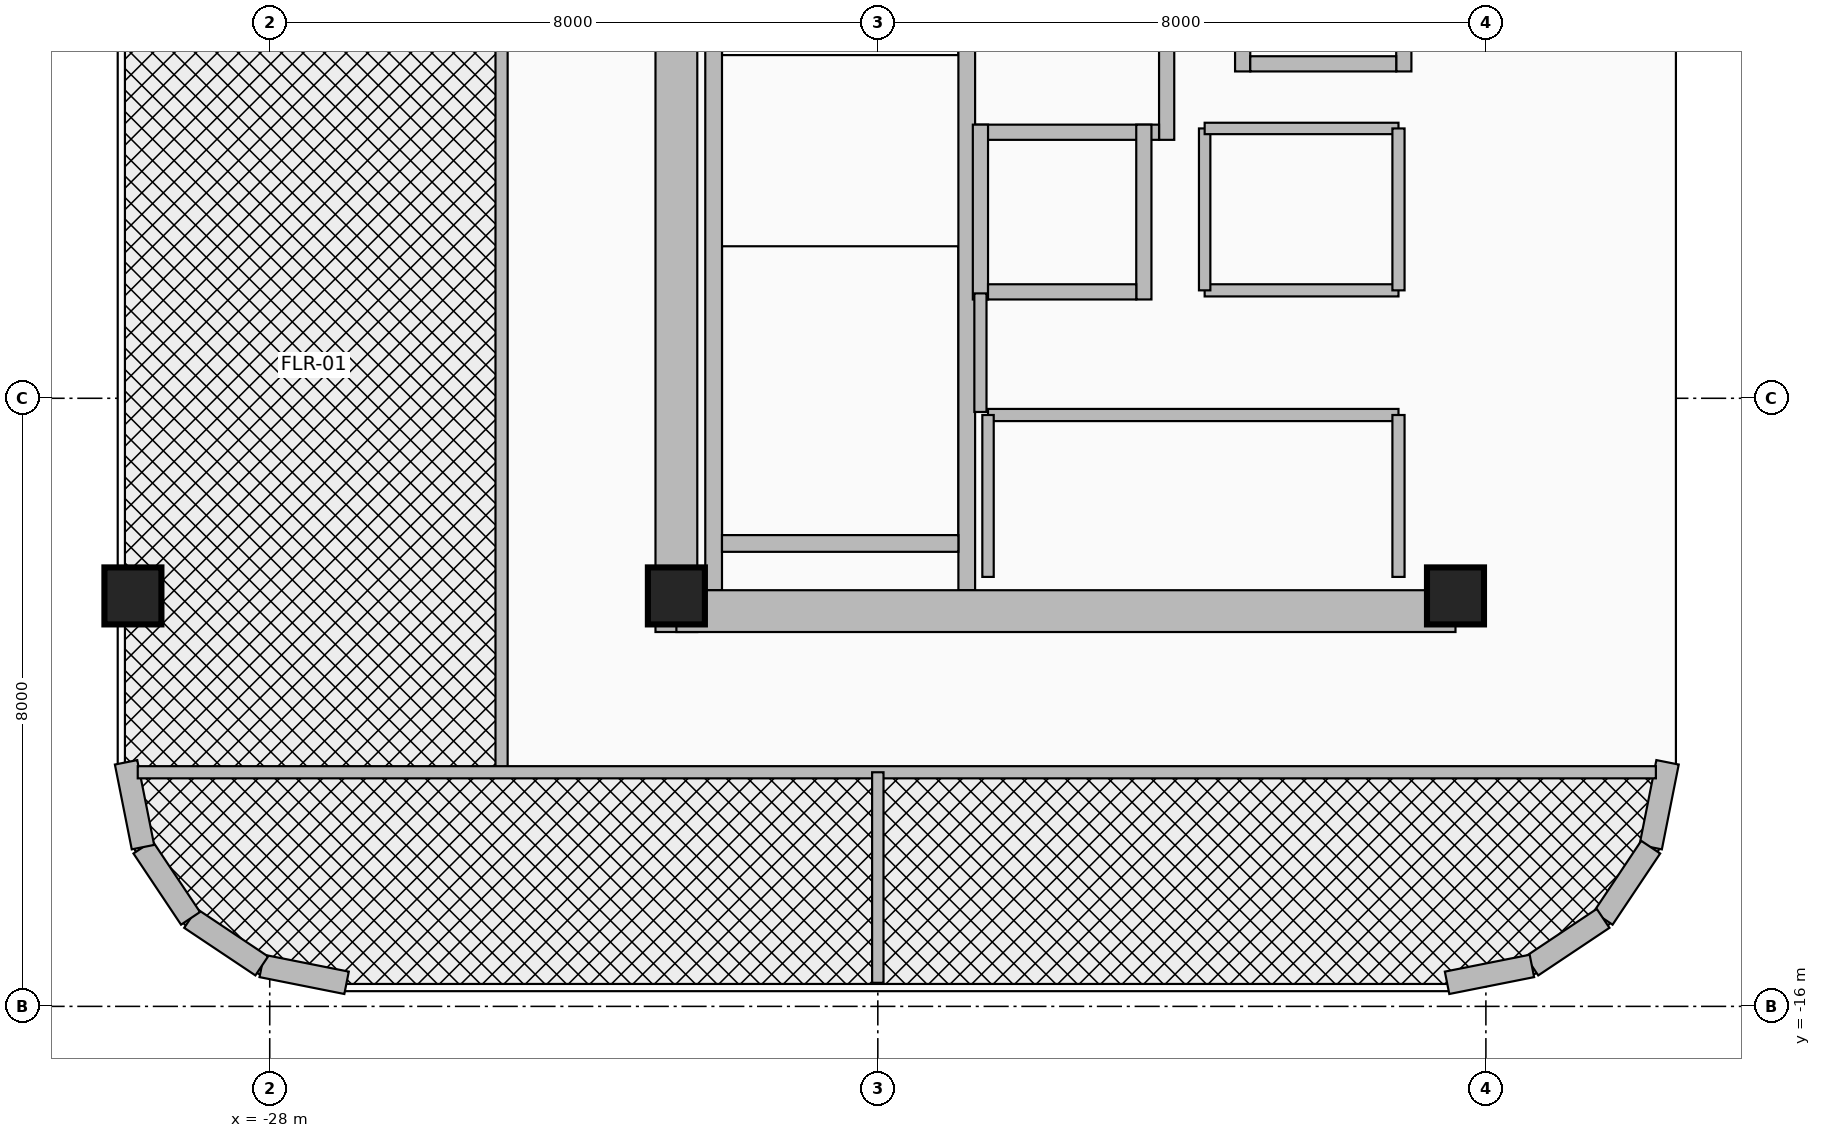
"""IFC4 building model, lengths in metres.
Left out: names, types, materials, properties, quantities, classifications, styles, units other than length and angle.
Written with IfcOpenShell. Run it as: python <this file> out.ifc"""

import sys

from ifc_helpers import new_model, si_unit, direction, frame, frame_2d, origin, origin_2d, place, context, subcontext, project, spatial, rectangle, extrude, source, transform, mapped, element, fill, save


model = new_model("IFC4")
c1 = context("Model", 3, precision=1e-05, world=origin(), true_north=direction((0.0, 1.0)))
c2 = subcontext(c1, "Body", "Model", "MODEL_VIEW")
j1 = project(units=[si_unit("LENGTHUNIT", "METRE"), si_unit("PLANEANGLEUNIT", "RADIAN")], contexts=[c1])
p1 = place(None, origin())
s1 = spatial("IfcSite", under=j1, at=p1, CompositionType="ELEMENT")
p2 = place(p1, origin())
s2 = spatial("IfcBuilding", under=s1, at=p2, CompositionType="ELEMENT")
p3 = place(p2, frame((0.0, 0.0, 290.6)))
s3 = spatial("IfcBuildingStorey", under=s2, at=p3, CompositionType="ELEMENT", Elevation=290.6)
for number, where, z_axis, x_axis in (
    (1, (-22.16, -10.525, 0.0), (0.0, 0.0, 1.0), (0.0, 1.0, 0.0)),
    (2, (-18.83, -10.525, 0.0), (0.0, 0.0, 1.0), (0.0, 1.0, 0.0)),
):
    element("IfcWall", number, at=place(p3, frame(where, z_axis=z_axis, x_axis=x_axis)), inside=s3, PredefinedType="SHEAR", context=c2, shape_type="SweptSolid", body=[
        extrude(rectangle(XDim=8.745, YDim=0.22, at=frame_2d((4.373, 0.0))), origin(), (0.0, 0.0, 1.0), 3.36),
    ])
p4 = place(p3, frame((-22.05, -9.91, 0.0), z_axis=(0.0, 0.0, 1.0), x_axis=(1.0, 0.0, 0.0)))
e3 = element("IfcWall", 3, at=p4, inside=s3, PredefinedType="SHEAR", context=c2, shape_type="SweptSolid", body=[
    extrude(rectangle(XDim=3.11, YDim=0.22, at=frame_2d((1.555, 0.0))), origin(), (0.0, 0.0, 1.0), 3.36),
])
p5 = place(p3, frame((-22.65, -11.075, 0.0), z_axis=(0.0, 0.0, 1.0), x_axis=(0.0, 1.0, 0.0)))
e4 = element("IfcWall", 4, at=p5, inside=s3, PredefinedType="SHEAR", context=c2, shape_type="SweptSolid", body=[
    extrude(rectangle(XDim=22.15, YDim=0.55, at=frame_2d((11.075, 0.0))), origin(), (0.0, 0.0, 1.0), 3.36),
])
p6 = place(p3, frame((-22.65, -10.8, 0.0), z_axis=(0.0, 0.0, 1.0), x_axis=(1.0, 0.0, 0.0)))
e5 = element("IfcWall", 5, at=p6, inside=s3, PredefinedType="SHEAR", context=c2, shape_type="SweptSolid", body=[
    extrude(rectangle(XDim=10.25, YDim=0.55, at=frame_2d((5.125, 0.0))), origin(), (0.0, 0.0, 1.0), 3.36),
])
m1 = source(origin(), c2, "Body", "SweptSolid", [
    extrude(rectangle(XDim=0.75, YDim=0.75, at=origin_2d()), origin(), (0.0, 0.0, 1.0), 3.6),
])
for number, where, z_axis, x_axis in (
    (6, (-29.8, -10.6, 0.0), (0.0, 0.0, 1.0), (1.0, 0.0, 0.0)),
    (7, (-22.65, -10.6, 0.0), (0.0, 0.0, 1.0), (1.0, 0.0, 0.0)),
    (8, (-12.4, -10.6, 0.0), (0.0, 0.0, 1.0), (1.0, 0.0, 0.0)),
):
    element("IfcColumn", number, at=place(p3, frame(where, z_axis=z_axis, x_axis=x_axis)), inside=s3, PredefinedType="COLUMN", context=c2, shape_type="MappedRepresentation", body=[
        mapped(m1, transform((0.0, 0.0, 0.0), x_axis=(1.0, 0.0, 0.0), y_axis=(0.0, 1.0, 0.0), z_axis=(0.0, 0.0, 1.0), scale=1.0)),
    ])
p7 = place(p3, frame((-9.61, -12.789, 0.0), z_axis=(0.0, 0.0, 1.0), x_axis=(-0.195043173023, -0.980794657743, 0.0)))
e9 = element("IfcWall", 9, at=p7, inside=s3, PredefinedType="SOLIDWALL", context=c2, shape_type="SweptSolid", body=[
    extrude(rectangle(XDim=1.138, YDim=0.3, at=frame_2d((0.569, 0.0))), origin(), (0.0, 0.0, 1.0), 3.36),
])
for number, where, z_axis, x_axis in (
    (10, (-9.832, -13.905, 0.0), (0.0, 0.0, 1.0), (-0.556, -0.831, 0.0)),
    (11, (-10.458, -14.842, 0.0), (0.0, 0.0, 1.0), (-0.831, -0.556, 0.0)),
):
    element("IfcWall", number, at=place(p3, frame(where, z_axis=z_axis, x_axis=x_axis)), inside=s3, PredefinedType="SOLIDWALL", context=c2, shape_type="SweptSolid", body=[
        extrude(rectangle(XDim=1.127, YDim=0.3, at=frame_2d((0.563, 0.0))), origin(), (0.0, 0.0, 1.0), 3.36),
    ])
for number, where, z_axis, x_axis in (
    (12, (-11.395, -15.468, 0.0), (0.0, 0.0, 1.0), (-0.981, -0.195, 0.0)),
    (13, (-26.989, -15.69, 0.0), (0.0, 0.0, 1.0), (-0.981, 0.195, 0.0)),
):
    element("IfcWall", number, at=place(p3, frame(where, z_axis=z_axis, x_axis=x_axis)), inside=s3, PredefinedType="SOLIDWALL", context=c2, shape_type="SweptSolid", body=[
        extrude(rectangle(XDim=1.138, YDim=0.3, at=frame_2d((0.569, 0.0))), origin(), (0.0, 0.0, 1.0), 3.36),
    ])
for number, where, z_axis, x_axis in (
    (14, (-28.105, -15.468, 0.0), (0.0, 0.0, 1.0), (-0.831, 0.556, 0.0)),
    (15, (-29.042, -14.842, 0.0), (0.0, 0.0, 1.0), (-0.556, 0.831, 0.0)),
):
    element("IfcWall", number, at=place(p3, frame(where, z_axis=z_axis, x_axis=x_axis)), inside=s3, PredefinedType="SOLIDWALL", context=c2, shape_type="SweptSolid", body=[
        extrude(rectangle(XDim=1.127, YDim=0.3, at=frame_2d((0.563, 0.0))), origin(), (0.0, 0.0, 1.0), 3.36),
    ])
p8 = place(p3, frame((-29.668, -13.905, 0.0), z_axis=(0.0, 0.0, 1.0), x_axis=(-0.195043173023, 0.980794657743, 0.0)))
e16 = element("IfcWall", 16, at=p8, inside=s3, PredefinedType="SOLIDWALL", context=c2, shape_type="SweptSolid", body=[
    extrude(rectangle(XDim=1.138, YDim=0.3, at=frame_2d((0.569, 0.0))), origin(), (0.0, 0.0, 1.0), 3.36),
])
p9 = place(p3, frame((-16.2, -4.6, 0.0), z_axis=(0.0, 0.0, 1.0), x_axis=(0.0, 1.0, 0.0)))
e17 = element("IfcWall", 17, at=p9, inside=s3, PredefinedType="MOVABLE", context=c2, shape_type="SweptSolid", body=[
    extrude(rectangle(XDim=3.2, YDim=0.2, at=frame_2d((1.6, 0.0))), origin(), (0.0, 0.0, 1.0), 3.36),
])
p10 = place(p3, frame((-18.72, -4.5, 0.0), z_axis=(0.0, 0.0, 1.0), x_axis=(1.0, 0.0, 0.0)))
e18 = element("IfcWall", 18, at=p10, inside=s3, PredefinedType="MOVABLE", context=c2, shape_type="SweptSolid", body=[
    extrude(rectangle(XDim=2.42, YDim=0.2, at=frame_2d((1.21, 0.0))), origin(), (0.0, 0.0, 1.0), 3.36),
])
for number, where, z_axis, x_axis in (
    (19, (-18.65, -6.7, 0.0), (0.0, 0.0, 1.0), (0.0, 1.0, 0.0)),
    (20, (-16.5, -6.7, 0.0), (0.0, 0.0, 1.0), (0.0, 1.0, 0.0)),
):
    element("IfcWall", number, at=place(p3, frame(where, z_axis=z_axis, x_axis=x_axis)), inside=s3, PredefinedType="MOVABLE", context=c2, shape_type="SweptSolid", body=[
        extrude(rectangle(XDim=2.3, YDim=0.2, at=frame_2d((1.15, 0.0))), origin(), (0.0, 0.0, 1.0), 3.36),
    ])
p11 = place(p3, frame((-18.55, -6.6, 0.0), z_axis=(0.0, 0.0, 1.0), x_axis=(1.0, 0.0, 0.0)))
e21 = element("IfcWall", 21, at=p11, inside=s3, PredefinedType="MOVABLE", context=c2, shape_type="SweptSolid", body=[
    extrude(rectangle(XDim=1.95, YDim=0.2, at=frame_2d((0.975, 0.0))), origin(), (0.0, 0.0, 1.0), 3.36),
])
p12 = place(p11, frame((0.425, 0.0, 0.0)))
e22 = element("IfcOpeningElement", 22, at=p12, cuts=e21, PredefinedType="OPENING", context=c2, shape_type="SweptSolid", body=[
    extrude(rectangle(XDim=1.1, YDim=2.1, at=frame_2d((0.55, 1.05))), frame((0.0, 0.115, 0.0), z_axis=(0.0, -1.0, 0.0), x_axis=(1.0, 0.0, 0.0)), (0.0, 0.0, 1.0), 0.23),
])
for number, where, z_axis, x_axis in (
    (23, (-15.2, -3.7, 0.0), (0.0, 0.0, 1.0), (0.0, 1.0, 0.0)),
    (24, (-13.08, -3.7, 0.0), (0.0, 0.0, 1.0), (0.0, 1.0, 0.0)),
):
    element("IfcWall", number, at=place(p3, frame(where, z_axis=z_axis, x_axis=x_axis)), inside=s3, PredefinedType="MOVABLE", context=c2, shape_type="SweptSolid", body=[
        extrude(rectangle(XDim=2.35, YDim=0.2, at=frame_2d((1.175, 0.0))), origin(), (0.0, 0.0, 1.0), 3.36),
    ])
p13 = place(p3, frame((-15.1, -3.6, 0.0), z_axis=(0.0, 0.0, 1.0), x_axis=(1.0, 0.0, 0.0)))
e25 = element("IfcWall", 25, at=p13, inside=s3, PredefinedType="MOVABLE", context=c2, shape_type="SweptSolid", body=[
    extrude(rectangle(XDim=1.92, YDim=0.2, at=frame_2d((0.96, 0.0))), origin(), (0.0, 0.0, 1.0), 3.36),
])
p14 = place(p3, frame((-18.65, -8.18, 0.0), z_axis=(0.0, 0.0, 1.0), x_axis=(0.0, 1.0, 0.0)))
e26 = element("IfcWall", 26, at=p14, inside=s3, PredefinedType="PARTITIONING", context=c2, shape_type="SweptSolid", body=[
    extrude(rectangle(XDim=1.56, YDim=0.16, at=frame_2d((0.78, 0.0))), origin(), (0.0, 0.0, 1.0), 3.36),
])
p15 = place(p3, frame((-18.55, -8.22, 0.0), z_axis=(0.0, 0.0, 1.0), x_axis=(1.0, 0.0, 0.0)))
e27 = element("IfcWall", 27, at=p15, inside=s3, PredefinedType="PARTITIONING", context=c2, shape_type="SweptSolid", body=[
    extrude(rectangle(XDim=5.4, YDim=0.16, at=frame_2d((2.7, 0.0))), origin(), (0.0, 0.0, 1.0), 3.36),
])
p16 = place(p15, frame((1.15, 0.0, 0.0)))
e28 = element("IfcOpeningElement", 28, at=p16, cuts=e27, PredefinedType="OPENING", context=c2, shape_type="SweptSolid", body=[
    extrude(rectangle(XDim=0.95, YDim=2.15, at=frame_2d((0.475, 1.075))), frame((0.0, 0.095, 0.0), z_axis=(0.0, -1.0, 0.0), x_axis=(1.0, 0.0, 0.0)), (0.0, 0.0, 1.0), 0.19),
])
p17 = place(p3, frame((-18.55, -10.35, 0.0), z_axis=(0.0, 0.0, 1.0), x_axis=(0.0, 1.0, 0.0)))
e29 = element("IfcWall", 29, at=p17, inside=s3, PredefinedType="PARTITIONING", context=c2, shape_type="SweptSolid", body=[
    extrude(rectangle(XDim=2.13, YDim=0.15, at=frame_2d((1.065, 0.0))), origin(), (0.0, 0.0, 1.0), 3.36),
])
p18 = place(p3, frame((-13.15, -10.35, 0.0), z_axis=(0.0, 0.0, 1.0), x_axis=(0.0, 1.0, 0.0)))
e30 = element("IfcWall", 30, at=p18, inside=s3, PredefinedType="PARTITIONING", context=c2, shape_type="SweptSolid", body=[
    extrude(rectangle(XDim=2.13, YDim=0.16, at=frame_2d((1.065, 0.0))), origin(), (0.0, 0.0, 1.0), 3.36),
])
p19 = place(p3, frame((-15.7, -6.58, 0.0), z_axis=(0.0, 0.0, 1.0), x_axis=(1.0, 0.0, 0.0)))
e31 = element("IfcWall", 31, at=p19, inside=s3, PredefinedType="PARTITIONING", context=c2, shape_type="SweptSolid", body=[
    extrude(rectangle(XDim=2.55, YDim=0.16, at=frame_2d((1.275, 0.0))), origin(), (0.0, 0.0, 1.0), 3.36),
])
p20 = place(p19, frame((0.5, 0.0, 0.0)))
e32 = element("IfcOpeningElement", 32, at=p20, cuts=e31, PredefinedType="OPENING", context=c2, shape_type="SweptSolid", body=[
    extrude(rectangle(XDim=0.85, YDim=2.05, at=frame_2d((0.425, 1.025))), frame((0.0, 0.095, 0.0), z_axis=(0.0, -1.0, 0.0), x_axis=(1.0, 0.0, 0.0)), (0.0, 0.0, 1.0), 0.19),
])
p21 = place(p3, frame((-15.7, -6.58, 0.0), z_axis=(0.0, 0.0, 1.0), x_axis=(0.0, 1.0, 0.0)))
e33 = element("IfcWall", 33, at=p21, inside=s3, PredefinedType="PARTITIONING", context=c2, shape_type="SweptSolid", body=[
    extrude(rectangle(XDim=2.13, YDim=0.15, at=frame_2d((1.065, 0.0))), origin(), (0.0, 0.0, 1.0), 3.36),
])
p22 = place(p3, frame((-15.7, -4.45, 0.0), z_axis=(0.0, 0.0, 1.0), x_axis=(1.0, 0.0, 0.0)))
e34 = element("IfcWall", 34, at=p22, inside=s3, PredefinedType="PARTITIONING", context=c2, shape_type="SweptSolid", body=[
    extrude(rectangle(XDim=2.55, YDim=0.15, at=frame_2d((1.275, 0.0))), origin(), (0.0, 0.0, 1.0), 3.36),
])
p23 = place(p3, frame((-13.15, -6.58, 0.0), z_axis=(0.0, 0.0, 1.0), x_axis=(0.0, 1.0, 0.0)))
e35 = element("IfcWall", 35, at=p23, inside=s3, PredefinedType="PARTITIONING", context=c2, shape_type="SweptSolid", body=[
    extrude(rectangle(XDim=2.13, YDim=0.16, at=frame_2d((1.065, 0.0))), origin(), (0.0, 0.0, 1.0), 3.36),
])
p24 = place(p3, frame((-24.95, -12.92, 0.0), z_axis=(0.0, 0.0, 1.0), x_axis=(0.0, 1.0, 0.0)))
e36 = element("IfcWall", 36, at=p24, inside=s3, PredefinedType="PARTITIONING", context=c2, shape_type="SweptSolid", body=[
    extrude(rectangle(XDim=21.72, YDim=0.16, at=frame_2d((10.86, 0.0))), origin(), (0.0, 0.0, 1.0), 2.723),
])
p25 = place(p24, frame((2.5, 0.0, 0.0)))
e37 = element("IfcOpeningElement", 37, at=p25, cuts=e36, PredefinedType="OPENING", context=c2, shape_type="SweptSolid", body=[
    extrude(rectangle(XDim=1.8, YDim=2.15, at=frame_2d((0.9, 1.075))), frame((0.0, 0.095, 0.0), z_axis=(0.0, -1.0, 0.0), x_axis=(1.0, 0.0, 0.0)), (0.0, 0.0, 1.0), 0.19),
])
p26 = place(p24, frame((12.72, 0.0, 0.0)))
e38 = element("IfcOpeningElement", 38, at=p26, cuts=e36, PredefinedType="OPENING", context=c2, shape_type="SweptSolid", body=[
    extrude(rectangle(XDim=1.8, YDim=2.15, at=frame_2d((0.9, 1.075))), frame((0.0, 0.095, 0.0), z_axis=(0.0, -1.0, 0.0), x_axis=(1.0, 0.0, 0.0)), (0.0, 0.0, 1.0), 0.19),
])
p27 = place(p24, frame((17.92, 0.0, 0.0)))
e39 = element("IfcOpeningElement", 39, at=p27, cuts=e36, PredefinedType="OPENING", context=c2, shape_type="SweptSolid", body=[
    extrude(rectangle(XDim=0.9, YDim=2.1, at=frame_2d((0.45, 1.05))), frame((0.0, 0.095, 0.0), z_axis=(0.0, -1.0, 0.0), x_axis=(1.0, 0.0, 0.0)), (0.0, 0.0, 1.0), 0.19),
])
p28 = place(p3, frame((-29.737, -12.92, 0.0), z_axis=(0.0, 0.0, 1.0), x_axis=(1.0, 0.0, 0.0)))
e40 = element("IfcWall", 40, at=p28, inside=s3, PredefinedType="PARTITIONING", context=c2, shape_type="SweptSolid", body=[
    extrude(rectangle(XDim=19.973, YDim=0.16, at=frame_2d((9.987, 0.0))), origin(), (0.0, 0.0, 1.0), 3.36),
])
p29 = place(p28, frame((5.0, 0.0, 0.0)))
e41 = element("IfcOpeningElement", 41, at=p29, cuts=e40, PredefinedType="OPENING", context=c2, shape_type="SweptSolid", body=[
    extrude(rectangle(XDim=0.9, YDim=2.1, at=frame_2d((0.45, 1.05))), frame((0.0, 0.095, 0.0), z_axis=(0.0, -1.0, 0.0), x_axis=(1.0, 0.0, 0.0)), (0.0, 0.0, 1.0), 0.19),
])
p30 = place(p28, frame((14.5, 0.0, 0.0)))
e42 = element("IfcOpeningElement", 42, at=p30, cuts=e40, PredefinedType="OPENING", context=c2, shape_type="SweptSolid", body=[
    extrude(rectangle(XDim=0.9, YDim=2.1, at=frame_2d((0.45, 1.05))), frame((0.0, 0.095, 0.0), z_axis=(0.0, -1.0, 0.0), x_axis=(1.0, 0.0, 0.0)), (0.0, 0.0, 1.0), 0.19),
])
p31 = place(p3, frame((-20.0, -15.69, 0.0), z_axis=(0.0, 0.0, 1.0), x_axis=(0.0, 1.0, 0.0)))
e43 = element("IfcWall", 43, at=p31, inside=s3, PredefinedType="PARTITIONING", context=c2, shape_type="SweptSolid", body=[
    extrude(rectangle(XDim=2.77, YDim=0.15, at=frame_2d((1.385, 0.0))), origin(), (0.0, 0.0, 1.0), 3.36),
])
p32 = place(p12, origin())
e44 = element("IfcDoor", 44, at=p32, inside=s3, OperationType="DOUBLE_DOOR_SLIDING", PredefinedType="DOOR", context=c2, shape_type="SweptSolid", body=[
    extrude(rectangle(XDim=1.1, YDim=2.1, at=frame_2d((0.55, 1.05))), frame((0.0, 0.025, 0.0), z_axis=(0.0, -1.0, 0.0), x_axis=(1.0, 0.0, 0.0)), (0.0, 0.0, 1.0), 0.05),
])
fill(e22, e44)
p33 = place(p16, origin())
e45 = element("IfcDoor", 45, at=p33, inside=s3, OperationType="SINGLE_SWING_LEFT", PredefinedType="DOOR", context=c2, shape_type="SweptSolid", body=[
    extrude(rectangle(XDim=0.95, YDim=2.15, at=frame_2d((0.475, 1.075))), frame((0.0, 0.025, 0.0), z_axis=(0.0, -1.0, 0.0), x_axis=(1.0, 0.0, 0.0)), (0.0, 0.0, 1.0), 0.05),
])
fill(e28, e45)
p34 = place(p20, origin())
e46 = element("IfcDoor", 46, at=p34, inside=s3, OperationType="SINGLE_SWING_RIGHT", PredefinedType="DOOR", context=c2, shape_type="SweptSolid", body=[
    extrude(rectangle(XDim=0.85, YDim=2.05, at=frame_2d((0.425, 1.025))), frame((0.0, 0.025, 0.0), z_axis=(0.0, -1.0, 0.0), x_axis=(1.0, 0.0, 0.0)), (0.0, 0.0, 1.0), 0.05),
])
fill(e32, e46)
p35 = place(p25, origin())
e47 = element("IfcDoor", 47, at=p35, inside=s3, OperationType="DOUBLE_DOOR_SINGLE_SWING", PredefinedType="DOOR", context=c2, shape_type="SweptSolid", body=[
    extrude(rectangle(XDim=1.8, YDim=2.15, at=frame_2d((0.9, 1.075))), frame((0.0, 0.025, 0.0), z_axis=(0.0, -1.0, 0.0), x_axis=(1.0, 0.0, 0.0)), (0.0, 0.0, 1.0), 0.05),
])
fill(e37, e47)
p36 = place(p29, frame((0.9, 0.0, 0.0), z_axis=(0.0, 0.0, 1.0), x_axis=(-1.0, 0.0, 0.0)))
e48 = element("IfcDoor", 48, at=p36, inside=s3, OperationType="SINGLE_SWING_LEFT", PredefinedType="DOOR", context=c2, shape_type="SweptSolid", body=[
    extrude(rectangle(XDim=0.9, YDim=2.1, at=frame_2d((0.45, 1.05))), frame((0.0, 0.025, 0.0), z_axis=(0.0, -1.0, 0.0), x_axis=(1.0, 0.0, 0.0)), (0.0, 0.0, 1.0), 0.05),
])
fill(e41, e48)
p37 = place(p30, origin())
e49 = element("IfcDoor", 49, at=p37, inside=s3, OperationType="SINGLE_SWING_RIGHT", PredefinedType="DOOR", context=c2, shape_type="SweptSolid", body=[
    extrude(rectangle(XDim=0.9, YDim=2.1, at=frame_2d((0.45, 1.05))), frame((0.0, 0.025, 0.0), z_axis=(0.0, -1.0, 0.0), x_axis=(1.0, 0.0, 0.0)), (0.0, 0.0, 1.0), 0.05),
])
fill(e42, e49)
save(model, sys.argv[1])
